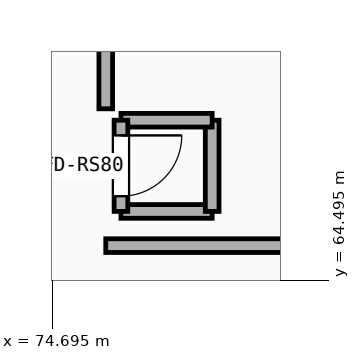
"""IFC4 building model, lengths in metres.
Left out: names, types, materials, properties, quantities, classifications, styles, units other than length and angle.
Written with IfcOpenShell. Run it as: python <this file> out.ifc"""

import sys

from ifc_helpers import new_model, si_unit, direction, frame, frame_2d, origin, place, context, subcontext, project, spatial, rectangle, extrude, element, fill, save


model = new_model("IFC4")
c1 = context("Model", 3, precision=1e-05, world=origin(), true_north=direction((0.0, 1.0)))
c2 = subcontext(c1, "Body", "Model", "MODEL_VIEW")
j1 = project(units=[si_unit("LENGTHUNIT", "METRE"), si_unit("PLANEANGLEUNIT", "RADIAN")], contexts=[c1])
p1 = place(None, origin())
s1 = spatial("IfcSite", under=j1, at=p1, CompositionType="ELEMENT")
p2 = place(p1, origin())
s2 = spatial("IfcBuilding", under=s1, at=p2, CompositionType="ELEMENT")
p3 = place(p2, origin())
s3 = spatial("IfcBuildingStorey", under=s2, at=p3, CompositionType="ELEMENT", Elevation=0.0)
p4 = place(p3, frame((75.4, 64.95, 0.0), z_axis=(0.0, 0.0, 1.0), x_axis=(1.0, 0.0, 0.0)))
e1 = element("IfcWall", 1, at=p4, inside=s3, PredefinedType="PARTITIONING", context=c2, shape_type="SweptSolid", body=[
    extrude(rectangle(XDim=11.25, YDim=0.18, at=frame_2d((5.625, 0.0))), origin(), (0.0, 0.0, 1.0), 4.64),
])
p5 = place(p3, frame((75.4, 66.75, 0.0), z_axis=(0.0, 0.0, 1.0), x_axis=(0.0, 1.0, 0.0)))
e2 = element("IfcWall", 2, at=p5, inside=s3, PredefinedType="PARTITIONING", context=c2, shape_type="SweptSolid", body=[
    extrude(rectangle(XDim=30.75, YDim=0.18, at=frame_2d((15.375, 0.0))), origin(), (0.0, 0.0, 1.0), 4.54),
])
p6 = place(p5, frame((6.413, 0.0, -0.01)))
e3 = element("IfcOpeningElement", 3, at=p6, cuts=e2, PredefinedType="OPENING", context=c2, shape_type="SweptSolid", body=[
    extrude(rectangle(XDim=1.6, YDim=2.21, at=frame_2d((0.8, 1.105))), frame((0.0, 0.1, 0.0), z_axis=(0.0, -1.0, 0.0), x_axis=(1.0, 0.0, 0.0)), (0.0, 0.0, 1.0), 0.2),
])
p7 = place(p3, frame((75.6, 65.4, 0.0), z_axis=(0.0, 0.0, 1.0), x_axis=(1.0, 0.0, 0.0)))
e4 = element("IfcWall", 4, at=p7, inside=s3, PredefinedType="SOLIDWALL", context=c2, shape_type="SweptSolid", body=[
    extrude(rectangle(XDim=1.2, YDim=0.18, at=frame_2d((0.6, 0.0))), origin(), (0.0, 0.0, 1.0), 5.07),
])
p8 = place(p3, frame((76.8, 65.4, 0.0), z_axis=(0.0, 0.0, 1.0), x_axis=(0.0, 1.0, 0.0)))
e5 = element("IfcWall", 5, at=p8, inside=s3, PredefinedType="SOLIDWALL", context=c2, shape_type="SweptSolid", body=[
    extrude(rectangle(XDim=1.2, YDim=0.18, at=frame_2d((0.6, 0.0))), origin(), (0.0, 0.0, 1.0), 5.07),
])
p9 = place(p3, frame((76.8, 66.6, 0.0), z_axis=(0.0, 0.0, 1.0), x_axis=(-1.0, 0.0, 0.0)))
e6 = element("IfcWall", 6, at=p9, inside=s3, PredefinedType="SOLIDWALL", context=c2, shape_type="SweptSolid", body=[
    extrude(rectangle(XDim=1.2, YDim=0.18, at=frame_2d((0.6, 0.0))), origin(), (0.0, 0.0, 1.0), 5.07),
])
p10 = place(p3, frame((75.6, 66.6, 0.0), z_axis=(0.0, 0.0, 1.0), x_axis=(0.0, -1.0, 0.0)))
e7 = element("IfcWall", 7, at=p10, inside=s3, PredefinedType="SOLIDWALL", context=c2, shape_type="SweptSolid", body=[
    extrude(rectangle(XDim=1.2, YDim=0.18, at=frame_2d((0.6, 0.0))), origin(), (0.0, 0.0, 1.0), 5.07),
])
p11 = place(p10, frame((0.2, 0.0, -0.01)))
e8 = element("IfcOpeningElement", 8, at=p11, cuts=e7, PredefinedType="OPENING", context=c2, shape_type="SweptSolid", body=[
    extrude(rectangle(XDim=0.8, YDim=2.06, at=frame_2d((0.4, 1.03))), frame((0.0, 0.1, 0.0), z_axis=(0.0, -1.0, 0.0), x_axis=(1.0, 0.0, 0.0)), (0.0, 0.0, 1.0), 0.2),
])
p12 = place(p11, frame((0.0, 0.0, 0.01)))
e9 = element("IfcDoor", 9, at=p12, inside=s3, OperationType="SINGLE_SWING_LEFT", PredefinedType="DOOR", context=c2, shape_type="SweptSolid", body=[
    extrude(rectangle(XDim=0.8, YDim=2.05, at=frame_2d((0.4, 1.025))), frame((0.0, 0.025, 0.0), z_axis=(0.0, -1.0, 0.0), x_axis=(1.0, 0.0, 0.0)), (0.0, 0.0, 1.0), 0.05),
])
fill(e8, e9)
save(model, sys.argv[1])
